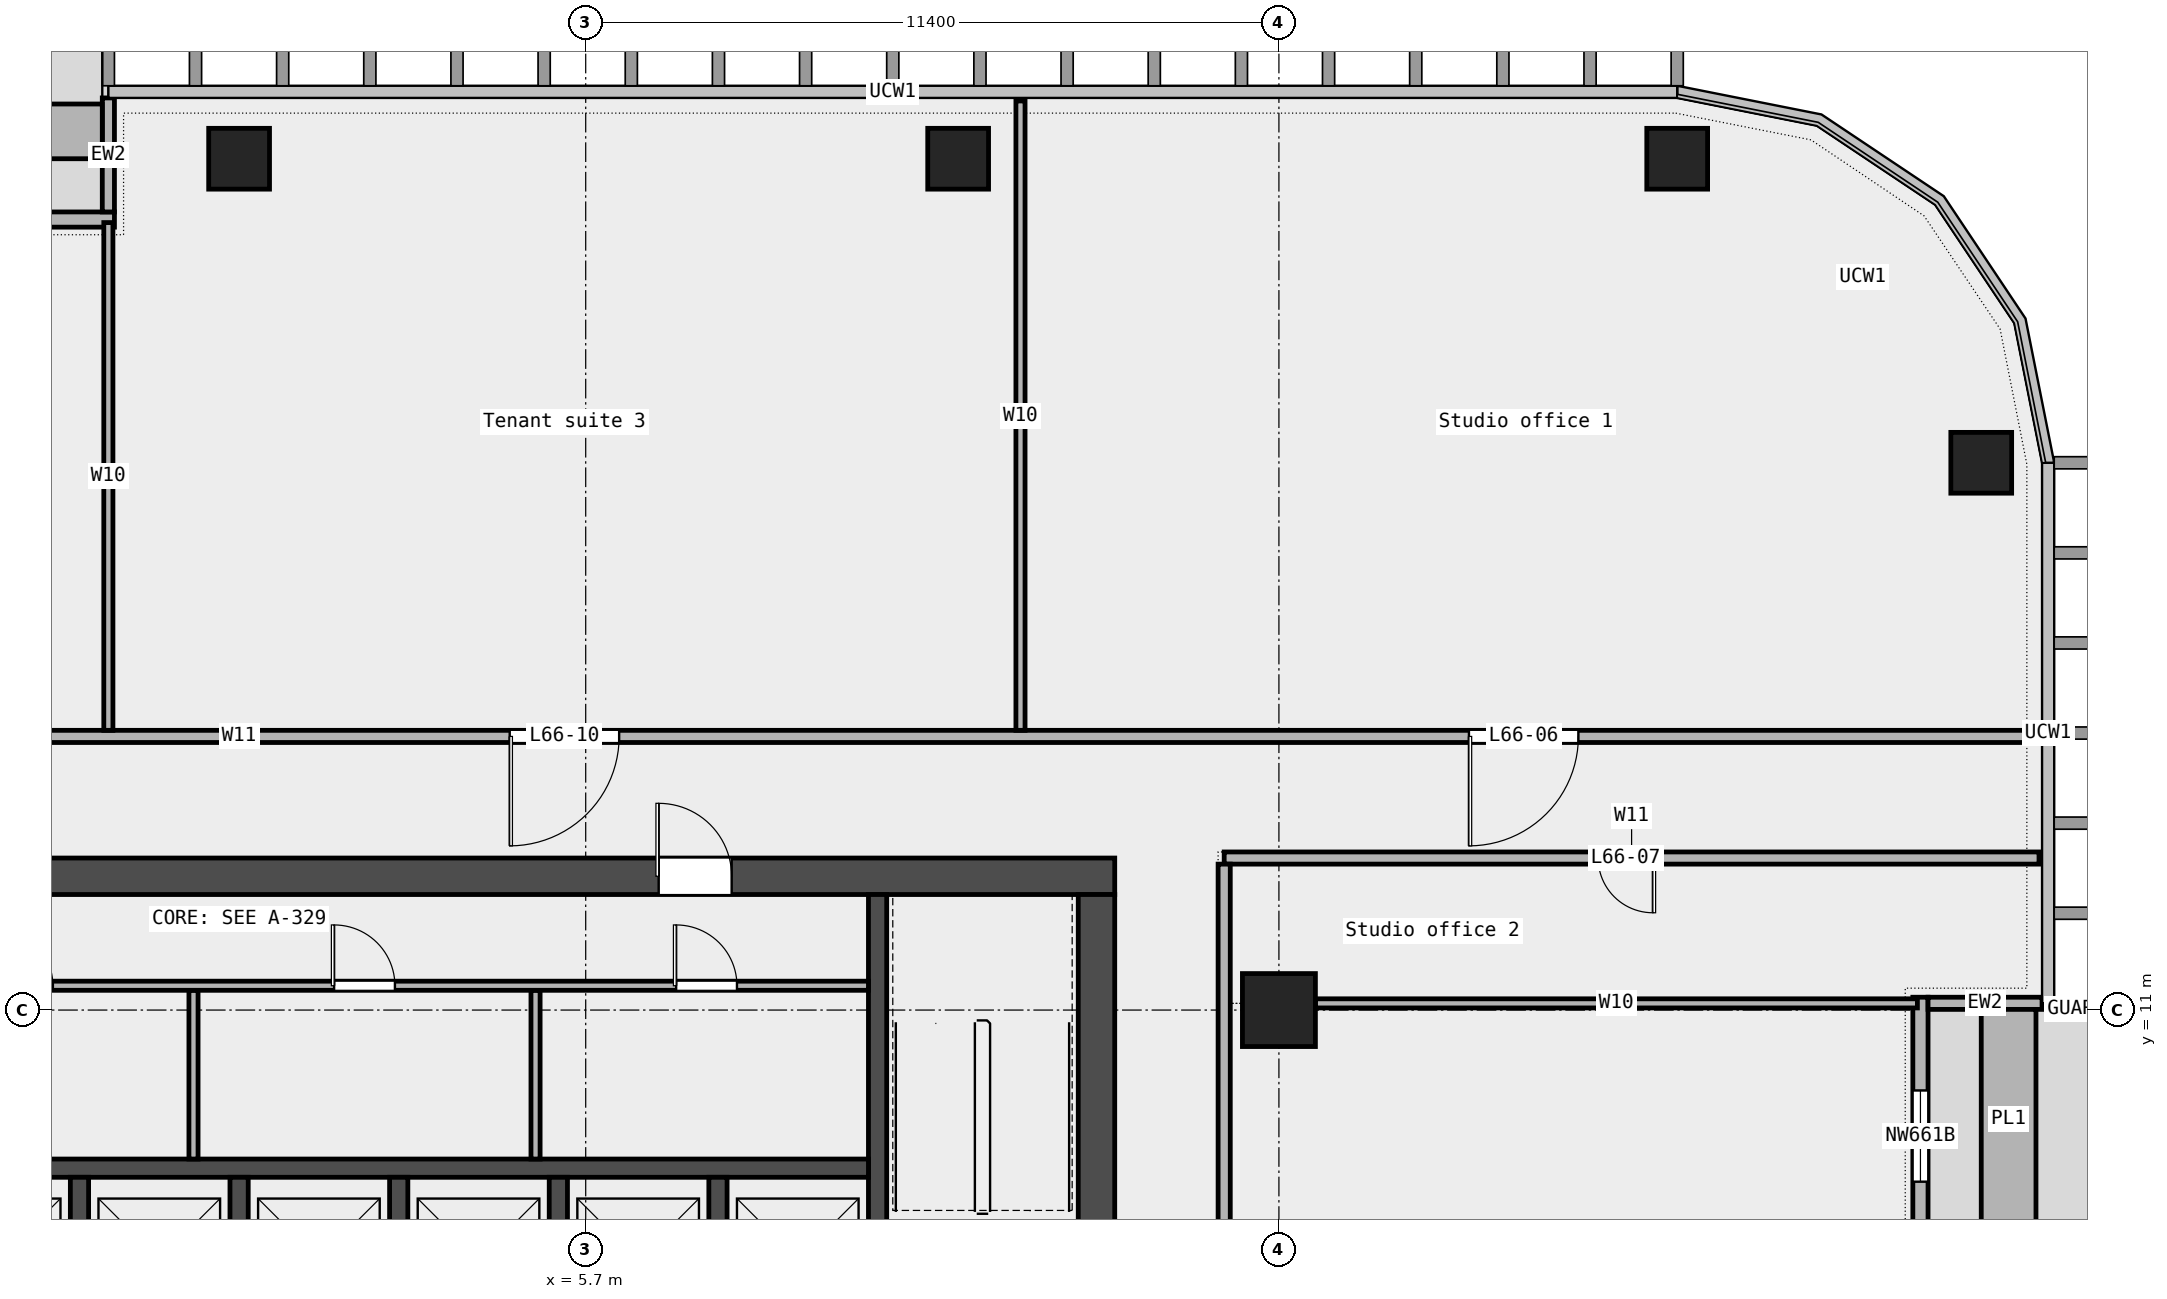
"""IFC4 building model, lengths in metres.
Left out: names, types, materials, properties, quantities, classifications, styles, units other than length and angle.
Written with IfcOpenShell. Run it as: python <this file> out.ifc"""

import sys

from ifc_helpers import new_model, si_unit, direction, frame, frame_2d, origin, origin_2d, place, context, subcontext, project, spatial, rectangle, extrude, element, fill, save


model = new_model("IFC4")
c1 = context("Model", 3, precision=1e-05, world=origin(), true_north=direction((0.0, 1.0)))
c2 = subcontext(c1, "Body", "Model", "MODEL_VIEW")
j1 = project(units=[si_unit("LENGTHUNIT", "METRE"), si_unit("PLANEANGLEUNIT", "RADIAN")], contexts=[c1])
p1 = place(None, origin())
s1 = spatial("IfcSite", under=j1, at=p1, CompositionType="ELEMENT")
p2 = place(p1, origin())
s2 = spatial("IfcBuilding", under=s1, at=p2, CompositionType="ELEMENT")
p3 = place(p2, frame((0.0, 0.0, 303.4)))
s3 = spatial("IfcBuildingStorey", under=s2, at=p3, CompositionType="ELEMENT", Elevation=303.4)
for number, where, z_axis, x_axis in (
    (1, (28.65, 20.0, 0.0), (0.0, 0.0, 1.0), (1.0, 0.0, 0.0)),
    (2, (23.65, 25.0, 0.0), (0.0, 0.0, 1.0), (1.0, 0.0, 0.0)),
    (3, (11.825, 25.0, 0.0), (0.0, 0.0, 1.0), (1.0, 0.0, 0.0)),
    (4, (0.0, 25.0, 0.0), (0.0, 0.0, 1.0), (1.0, 0.0, 0.0)),
):
    element("IfcColumn", number, at=place(p3, frame(where, z_axis=z_axis, x_axis=x_axis)), inside=s3, PredefinedType="COLUMN", context=c2, shape_type="SweptSolid", body=[
        extrude(rectangle(XDim=1.0, YDim=1.0, at=origin_2d()), origin(), (0.0, 0.0, 1.0), 3.6),
    ])
p4 = place(p3, frame((17.1, 11.0, 0.0), z_axis=(0.0, 0.0, 1.0), x_axis=(1.0, 0.0, 0.0)))
e5 = element("IfcColumn", 5, at=p4, inside=s3, PredefinedType="COLUMN", context=c2, shape_type="SweptSolid", body=[
    extrude(rectangle(XDim=1.2, YDim=1.2, at=origin_2d()), origin(), (0.0, 0.0, 1.0), 3.6),
])
p5 = place(p3, frame((27.65, -2.322, 0.0), z_axis=(0.0, 0.0, 1.0), x_axis=(0.0, 1.0, 0.0)))
e6 = element("IfcWall", 6, at=p5, inside=s3, PredefinedType="STANDARD", context=c2, shape_type="SweptSolid", body=[
    extrude(rectangle(XDim=13.533, YDim=0.25, at=frame_2d((6.767, 0.0))), origin(), (0.0, 0.0, 1.0), 3.6),
])
p6 = place(p5, frame((1.5, 0.0, 0.45)))
e7 = element("IfcOpeningElement", 7, at=p6, cuts=e6, PredefinedType="OPENING", context=c2, shape_type="SweptSolid", body=[
    extrude(rectangle(XDim=1.5, YDim=2.4, at=frame_2d((0.75, 1.2))), frame((0.0, 0.137, 0.0), z_axis=(0.0, -1.0, 0.0), x_axis=(1.0, 0.0, 0.0)), (0.0, 0.0, 1.0), 0.274),
])
p7 = place(p5, frame((5.75, 0.0, 0.0)))
e8 = element("IfcOpeningElement", 8, at=p7, cuts=e6, PredefinedType="OPENING", context=c2, shape_type="SweptSolid", body=[
    extrude(rectangle(XDim=1.8, YDim=2.4, at=frame_2d((0.9, 1.2))), frame((0.0, 0.137, 0.0), z_axis=(0.0, -1.0, 0.0), x_axis=(1.0, 0.0, 0.0)), (0.0, 0.0, 1.0), 0.274),
])
p8 = place(p5, frame((10.5, 0.0, 0.45)))
e9 = element("IfcOpeningElement", 9, at=p8, cuts=e6, PredefinedType="OPENING", context=c2, shape_type="SweptSolid", body=[
    extrude(rectangle(XDim=1.5, YDim=2.4, at=frame_2d((0.75, 1.2))), frame((0.0, 0.137, 0.0), z_axis=(0.0, -1.0, 0.0), x_axis=(1.0, 0.0, 0.0)), (0.0, 0.0, 1.0), 0.274),
])
p9 = place(p3, frame((29.65, 11.111, 0.0), z_axis=(0.0, 0.0, 1.0), x_axis=(-1.0, 0.0, 0.0)))
e10 = element("IfcWall", 10, at=p9, inside=s3, PredefinedType="STANDARD", context=c2, shape_type="SweptSolid", body=[
    extrude(rectangle(XDim=1.875, YDim=0.2, at=frame_2d((0.938, 0.0))), origin(), (0.0, 0.0, 1.0), 3.6),
])
p10 = place(p3, frame((29.1, 7.411, 0.0), z_axis=(0.0, 0.0, 1.0), x_axis=(0.0, 1.0, 0.0)))
e11 = element("IfcWall", 11, at=p10, inside=s3, PredefinedType="STANDARD", context=c2, shape_type="SweptSolid", body=[
    extrude(rectangle(XDim=3.6, YDim=0.9, at=frame_2d((1.8, 0.0))), origin(), (0.0, 0.0, 1.0), 0.7),
])
p11 = place(p3, frame((-2.05, 24.0, 0.0), z_axis=(0.0, 0.0, 1.0), x_axis=(-1.0, 0.0, 0.0)))
e12 = element("IfcWall", 12, at=p11, inside=s3, PredefinedType="STANDARD", context=c2, shape_type="SweptSolid", body=[
    extrude(rectangle(XDim=13.1, YDim=0.25, at=frame_2d((6.55, 0.0))), origin(), (0.0, 0.0, 1.0), 3.6),
])
p12 = place(p11, frame((1.5, 0.0, 0.45)))
e13 = element("IfcOpeningElement", 13, at=p12, cuts=e12, PredefinedType="OPENING", context=c2, shape_type="SweptSolid", body=[
    extrude(rectangle(XDim=1.5, YDim=2.4, at=frame_2d((0.75, 1.2))), frame((0.0, 0.137, 0.0), z_axis=(0.0, -1.0, 0.0), x_axis=(1.0, 0.0, 0.0)), (0.0, 0.0, 1.0), 0.274),
])
p13 = place(p11, frame((5.75, 0.0, 0.0)))
e14 = element("IfcOpeningElement", 14, at=p13, cuts=e12, PredefinedType="OPENING", context=c2, shape_type="SweptSolid", body=[
    extrude(rectangle(XDim=1.8, YDim=2.4, at=frame_2d((0.9, 1.2))), frame((0.0, 0.137, 0.0), z_axis=(0.0, -1.0, 0.0), x_axis=(1.0, 0.0, 0.0)), (0.0, 0.0, 1.0), 0.274),
])
p14 = place(p11, frame((10.75, 0.0, 0.45)))
e15 = element("IfcOpeningElement", 15, at=p14, cuts=e12, PredefinedType="OPENING", context=c2, shape_type="SweptSolid", body=[
    extrude(rectangle(XDim=1.5, YDim=2.4, at=frame_2d((0.75, 1.2))), frame((0.0, 0.137, 0.0), z_axis=(0.0, -1.0, 0.0), x_axis=(1.0, 0.0, 0.0)), (0.0, 0.0, 1.0), 0.274),
])
p15 = place(p3, frame((-2.15, 26.0, 0.0), z_axis=(0.0, 0.0, 1.0), x_axis=(0.0, -1.0, 0.0)))
e16 = element("IfcWall", 16, at=p15, inside=s3, PredefinedType="STANDARD", context=c2, shape_type="SweptSolid", body=[
    extrude(rectangle(XDim=1.875, YDim=0.2, at=frame_2d((0.938, 0.0))), origin(), (0.0, 0.0, 1.0), 3.6),
])
p16 = place(p3, frame((-2.25, 25.45, 0.0), z_axis=(0.0, 0.0, 1.0), x_axis=(-1.0, 0.0, 0.0)))
e17 = element("IfcWall", 17, at=p16, inside=s3, PredefinedType="STANDARD", context=c2, shape_type="SweptSolid", body=[
    extrude(rectangle(XDim=3.6, YDim=0.9, at=frame_2d((1.8, 0.0))), origin(), (0.0, 0.0, 1.0), 0.7),
])
p17 = place(p3, frame((17.7, 11.11, 0.0), z_axis=(0.0, 0.0, 1.0), x_axis=(1.0, 0.0, 0.0)))
e18 = element("IfcWall", 18, at=p17, inside=s3, PredefinedType="PARTITIONING", context=c2, shape_type="SweptSolid", body=[
    extrude(rectangle(XDim=9.9, YDim=0.15, at=frame_2d((4.95, 0.0))), origin(), (0.0, 0.0, 1.0), 3.6),
])
p18 = place(p3, frame((16.2, 13.5, 0.0), z_axis=(0.0, 0.0, 1.0), x_axis=(1.0, 0.0, 0.0)))
e19 = element("IfcWall", 19, at=p18, inside=s3, PredefinedType="PARTITIONING", context=c2, shape_type="SweptSolid", body=[
    extrude(rectangle(XDim=13.4, YDim=0.2, at=frame_2d((6.7, 0.0))), origin(), (0.0, 0.0, 1.0), 3.6),
])
p19 = place(p18, frame((6.15, 0.0, 0.0)))
e20 = element("IfcOpeningElement", 20, at=p19, cuts=e19, PredefinedType="OPENING", context=c2, shape_type="SweptSolid", body=[
    extrude(rectangle(XDim=0.9, YDim=2.1, at=frame_2d((0.45, 1.05))), frame((0.0, 0.112, 0.0), z_axis=(0.0, -1.0, 0.0), x_axis=(1.0, 0.0, 0.0)), (0.0, 0.0, 1.0), 0.224),
])
p20 = place(p3, frame((-29.6, 15.5, 0.0), z_axis=(0.0, 0.0, 1.0), x_axis=(1.0, 0.0, 0.0)))
e21 = element("IfcWall", 21, at=p20, inside=s3, PredefinedType="PARTITIONING", context=c2, shape_type="SweptSolid", body=[
    extrude(rectangle(XDim=59.2, YDim=0.2, at=frame_2d((29.6, 0.0))), origin(), (0.0, 0.0, 1.0), 3.6),
])
p21 = place(p20, frame((20.25, 0.0, 0.0)))
e22 = element("IfcOpeningElement", 22, at=p21, cuts=e21, PredefinedType="OPENING", context=c2, shape_type="SweptSolid", body=[
    extrude(rectangle(XDim=1.5, YDim=2.1, at=frame_2d((0.75, 1.05))), frame((0.0, 0.112, 0.0), z_axis=(0.0, -1.0, 0.0), x_axis=(1.0, 0.0, 0.0)), (0.0, 0.0, 1.0), 0.224),
])
p22 = place(p20, frame((49.825, 0.0, 0.0)))
e23 = element("IfcOpeningElement", 23, at=p22, cuts=e21, PredefinedType="OPENING", context=c2, shape_type="SweptSolid", body=[
    extrude(rectangle(XDim=1.8, YDim=2.1, at=frame_2d((0.9, 1.05))), frame((0.0, 0.112, 0.0), z_axis=(0.0, -1.0, 0.0), x_axis=(1.0, 0.0, 0.0)), (0.0, 0.0, 1.0), 0.224),
])
p23 = place(p20, frame((34.05, 0.0, 0.0)))
e24 = element("IfcOpeningElement", 24, at=p23, cuts=e21, PredefinedType="OPENING", context=c2, shape_type="SweptSolid", body=[
    extrude(rectangle(XDim=1.8, YDim=2.1, at=frame_2d((0.9, 1.05))), frame((0.0, 0.112, 0.0), z_axis=(0.0, -1.0, 0.0), x_axis=(1.0, 0.0, 0.0)), (0.0, 0.0, 1.0), 0.224),
])
p24 = place(p20, frame((6.625, 0.0, 0.0)))
e25 = element("IfcOpeningElement", 25, at=p24, cuts=e21, PredefinedType="OPENING", context=c2, shape_type="SweptSolid", body=[
    extrude(rectangle(XDim=1.5, YDim=2.1, at=frame_2d((0.75, 1.05))), frame((0.0, 0.112, 0.0), z_axis=(0.0, -1.0, 0.0), x_axis=(1.0, 0.0, 0.0)), (0.0, 0.0, 1.0), 0.224),
])
p25 = place(p3, frame((-2.15, 15.6, 0.0), z_axis=(0.0, 0.0, 1.0), x_axis=(0.0, 1.0, 0.0)))
e26 = element("IfcWall", 26, at=p25, inside=s3, PredefinedType="PARTITIONING", context=c2, shape_type="SweptSolid", body=[
    extrude(rectangle(XDim=8.35, YDim=0.15, at=frame_2d((4.175, 0.0))), origin(), (0.0, 0.0, 1.0), 3.6),
])
p26 = place(p3, frame((12.85, 15.6, 0.0), z_axis=(0.0, 0.0, 1.0), x_axis=(0.0, 1.0, 0.0)))
e27 = element("IfcWall", 27, at=p26, inside=s3, PredefinedType="PARTITIONING", context=c2, shape_type="SweptSolid", body=[
    extrude(rectangle(XDim=10.35, YDim=0.15, at=frame_2d((5.175, 0.0))), origin(), (0.0, 0.0, 1.0), 3.6),
])
p27 = place(p3, frame((16.2, -7.1, 0.0), z_axis=(0.0, 0.0, 1.0), x_axis=(0.0, 1.0, 0.0)))
e28 = element("IfcWall", 28, at=p27, inside=s3, PredefinedType="PARTITIONING", context=c2, shape_type="SweptSolid", body=[
    extrude(rectangle(XDim=20.5, YDim=0.2, at=frame_2d((10.25, 0.0))), origin(), (0.0, 0.0, 1.0), 3.6),
])
p28 = place(p27, frame((10.795, 0.0, 0.0)))
e29 = element("IfcOpeningElement", 29, at=p28, cuts=e28, PredefinedType="OPENING", context=c2, shape_type="SweptSolid", body=[
    extrude(rectangle(XDim=1.5, YDim=2.1, at=frame_2d((0.75, 1.05))), frame((0.0, 0.112, 0.0), z_axis=(0.0, -1.0, 0.0), x_axis=(1.0, 0.0, 0.0)), (0.0, 0.0, 1.0), 0.224),
])
p29 = place(p3, frame((-14.4, 13.2, 0.0), z_axis=(0.0, 0.0, 1.0), x_axis=(1.0, 0.0, 0.0)))
e30 = element("IfcWall", 30, at=p29, inside=s3, PredefinedType="SHEAR", context=c2, shape_type="SweptSolid", body=[
    extrude(rectangle(XDim=28.8, YDim=0.6, at=frame_2d((14.4, 0.0))), origin(), (0.0, 0.0, 1.0), 3.7),
])
p30 = place(p29, frame((6.3, 0.0, 0.0)))
e31 = element("IfcOpeningElement", 31, at=p30, cuts=e30, PredefinedType="OPENING", context=c2, shape_type="SweptSolid", body=[
    extrude(rectangle(XDim=1.2, YDim=2.1, at=frame_2d((0.6, 1.05))), frame((0.0, 0.312, 0.0), z_axis=(0.0, -1.0, 0.0), x_axis=(1.0, 0.0, 0.0)), (0.0, 0.0, 1.0), 0.624),
])
p31 = place(p29, frame((21.3, 0.0, 0.0)))
e32 = element("IfcOpeningElement", 32, at=p31, cuts=e30, PredefinedType="OPENING", context=c2, shape_type="SweptSolid", body=[
    extrude(rectangle(XDim=1.2, YDim=2.1, at=frame_2d((0.6, 1.05))), frame((0.0, 0.312, 0.0), z_axis=(0.0, -1.0, 0.0), x_axis=(1.0, 0.0, 0.0)), (0.0, 0.0, 1.0), 0.624),
])
p32 = place(p3, frame((14.1, -6.6, 0.0), z_axis=(0.0, 0.0, 1.0), x_axis=(0.0, 1.0, 0.0)))
e33 = element("IfcWall", 33, at=p32, inside=s3, PredefinedType="SHEAR", context=c2, shape_type="SweptSolid", body=[
    extrude(rectangle(XDim=19.5, YDim=0.6, at=frame_2d((9.75, 0.0))), origin(), (0.0, 0.0, 1.0), 3.7),
])
p33 = place(p32, frame((9.3, 0.0, 0.0)))
e34 = element("IfcOpeningElement", 34, at=p33, cuts=e33, PredefinedType="OPENING", context=c2, shape_type="SweptSolid", body=[
    extrude(rectangle(XDim=1.8, YDim=2.1, at=frame_2d((0.9, 1.05))), frame((0.0, 0.312, 0.0), z_axis=(0.0, -1.0, 0.0), x_axis=(1.0, 0.0, 0.0)), (0.0, 0.0, 1.0), 0.624),
])
p34 = place(p3, frame((10.5, 5.25, 0.0), z_axis=(0.0, 0.0, 1.0), x_axis=(0.0, 1.0, 0.0)))
e35 = element("IfcWall", 35, at=p34, inside=s3, PredefinedType="SHEAR", context=c2, shape_type="SweptSolid", body=[
    extrude(rectangle(XDim=7.65, YDim=0.3, at=frame_2d((3.825, 0.0))), origin(), (0.0, 0.0, 1.0), 3.7),
])
p35 = place(p3, frame((-10.35, 8.4, 0.0), z_axis=(0.0, 0.0, 1.0), x_axis=(1.0, 0.0, 0.0)))
e36 = element("IfcWall", 36, at=p35, inside=s3, PredefinedType="SOLIDWALL", context=c2, shape_type="SweptSolid", body=[
    extrude(rectangle(XDim=20.7, YDim=0.3, at=frame_2d((10.35, 0.0))), origin(), (0.0, 0.0, 1.0), 3.7),
])
for number, where, z_axis, x_axis in (
    (37, (-2.625, 5.55, 0.0), (0.0, 0.0, 1.0), (0.0, 1.0, 0.0)),
    (38, (0.0, 5.55, 0.0), (0.0, 0.0, 1.0), (0.0, 1.0, 0.0)),
    (39, (2.625, 5.55, 0.0), (0.0, 0.0, 1.0), (0.0, 1.0, 0.0)),
    (40, (5.25, 5.55, 0.0), (0.0, 0.0, 1.0), (0.0, 1.0, 0.0)),
    (41, (7.875, 5.55, 0.0), (0.0, 0.0, 1.0), (0.0, 1.0, 0.0)),
):
    element("IfcWall", number, at=place(p3, frame(where, z_axis=z_axis, x_axis=x_axis)), inside=s3, PredefinedType="SOLIDWALL", context=c2, shape_type="SweptSolid", body=[
        extrude(rectangle(XDim=2.7, YDim=0.3, at=frame_2d((1.35, 0.0))), origin(), (0.0, 0.0, 1.0), 3.7),
    ])
for number, where, z_axis, x_axis in (
    (42, (-0.75, 8.55, 0.0), (0.0, 0.0, 1.0), (0.0, 1.0, 0.0)),
    (43, (4.875, 8.55, 0.0), (0.0, 0.0, 1.0), (0.0, 1.0, 0.0)),
):
    element("IfcWall", number, at=place(p3, frame(where, z_axis=z_axis, x_axis=x_axis)), inside=s3, PredefinedType="PARTITIONING", context=c2, shape_type="SweptSolid", body=[
        extrude(rectangle(XDim=2.775, YDim=0.15, at=frame_2d((1.387, 0.0))), origin(), (0.0, 0.0, 1.0), 3.7),
    ])
p36 = place(p3, frame((-10.35, 11.4, 0.0), z_axis=(0.0, 0.0, 1.0), x_axis=(1.0, 0.0, 0.0)))
e44 = element("IfcWall", 44, at=p36, inside=s3, PredefinedType="PARTITIONING", context=c2, shape_type="SweptSolid", body=[
    extrude(rectangle(XDim=20.7, YDim=0.15, at=frame_2d((10.35, 0.0))), origin(), (0.0, 0.0, 1.0), 3.7),
])
p37 = place(p36, frame((1.413, 0.0, 0.0)))
e45 = element("IfcOpeningElement", 45, at=p37, cuts=e44, PredefinedType="OPENING", context=c2, shape_type="SweptSolid", body=[
    extrude(rectangle(XDim=1.0, YDim=2.1, at=frame_2d((0.5, 1.05))), frame((0.0, 0.087, 0.0), z_axis=(0.0, -1.0, 0.0), x_axis=(1.0, 0.0, 0.0)), (0.0, 0.0, 1.0), 0.174),
])
p38 = place(p36, frame((6.288, 0.0, 0.0)))
e46 = element("IfcOpeningElement", 46, at=p38, cuts=e44, PredefinedType="OPENING", context=c2, shape_type="SweptSolid", body=[
    extrude(rectangle(XDim=1.0, YDim=2.1, at=frame_2d((0.5, 1.05))), frame((0.0, 0.087, 0.0), z_axis=(0.0, -1.0, 0.0), x_axis=(1.0, 0.0, 0.0)), (0.0, 0.0, 1.0), 0.174),
])
p39 = place(p36, frame((11.913, 0.0, 0.0)))
e47 = element("IfcOpeningElement", 47, at=p39, cuts=e44, PredefinedType="OPENING", context=c2, shape_type="SweptSolid", body=[
    extrude(rectangle(XDim=1.0, YDim=2.1, at=frame_2d((0.5, 1.05))), frame((0.0, 0.087, 0.0), z_axis=(0.0, -1.0, 0.0), x_axis=(1.0, 0.0, 0.0)), (0.0, 0.0, 1.0), 0.174),
])
p40 = place(p36, frame((17.538, 0.0, 0.0)))
e48 = element("IfcOpeningElement", 48, at=p40, cuts=e44, PredefinedType="OPENING", context=c2, shape_type="SweptSolid", body=[
    extrude(rectangle(XDim=1.0, YDim=2.1, at=frame_2d((0.5, 1.05))), frame((0.0, 0.087, 0.0), z_axis=(0.0, -1.0, 0.0), x_axis=(1.0, 0.0, 0.0)), (0.0, 0.0, 1.0), 0.174),
])
p41 = place(p8, origin())
e49 = element("IfcWindow", 49, at=p41, inside=s3, PartitioningType="SINGLE_PANEL", PredefinedType="WINDOW", context=c2, shape_type="SweptSolid", body=[
    extrude(rectangle(XDim=1.5, YDim=2.4, at=frame_2d((0.75, 1.2))), frame((0.0, 0.03, 0.0), z_axis=(0.0, -1.0, 0.0), x_axis=(1.0, 0.0, 0.0)), (0.0, 0.0, 1.0), 0.06),
])
fill(e9, e49)
p42 = place(p22, origin())
e50 = element("IfcDoor", 50, at=p42, inside=s3, OperationType="DOUBLE_DOOR_SINGLE_SWING", PredefinedType="DOOR", context=c2, shape_type="SweptSolid", body=[
    extrude(rectangle(XDim=1.8, YDim=2.1, at=frame_2d((0.9, 1.05))), frame((0.0, 0.025, 0.0), z_axis=(0.0, -1.0, 0.0), x_axis=(1.0, 0.0, 0.0)), (0.0, 0.0, 1.0), 0.05),
])
fill(e23, e50)
p43 = place(p19, origin())
e51 = element("IfcDoor", 51, at=p43, inside=s3, OperationType="SINGLE_SWING_LEFT", PredefinedType="DOOR", context=c2, shape_type="SweptSolid", body=[
    extrude(rectangle(XDim=0.9, YDim=2.1, at=frame_2d((0.45, 1.05))), frame((0.0, 0.025, 0.0), z_axis=(0.0, -1.0, 0.0), x_axis=(1.0, 0.0, 0.0)), (0.0, 0.0, 1.0), 0.05),
])
fill(e20, e51)
p44 = place(p23, origin())
e52 = element("IfcDoor", 52, at=p44, inside=s3, OperationType="DOUBLE_DOOR_SINGLE_SWING", PredefinedType="DOOR", context=c2, shape_type="SweptSolid", body=[
    extrude(rectangle(XDim=1.8, YDim=2.1, at=frame_2d((0.9, 1.05))), frame((0.0, 0.025, 0.0), z_axis=(0.0, -1.0, 0.0), x_axis=(1.0, 0.0, 0.0)), (0.0, 0.0, 1.0), 0.05),
])
fill(e24, e52)
p45 = place(p38, origin())
e53 = element("IfcDoor", 53, at=p45, inside=s3, OperationType="SINGLE_SWING_LEFT", PredefinedType="DOOR", context=c2, shape_type="SweptSolid", body=[
    extrude(rectangle(XDim=1.0, YDim=2.1, at=frame_2d((0.5, 1.05))), frame((0.0, 0.025, 0.0), z_axis=(0.0, -1.0, 0.0), x_axis=(1.0, 0.0, 0.0)), (0.0, 0.0, 1.0), 0.05),
])
fill(e46, e53)
p46 = place(p39, origin())
e54 = element("IfcDoor", 54, at=p46, inside=s3, OperationType="SINGLE_SWING_LEFT", PredefinedType="DOOR", context=c2, shape_type="SweptSolid", body=[
    extrude(rectangle(XDim=1.0, YDim=2.1, at=frame_2d((0.5, 1.05))), frame((0.0, 0.025, 0.0), z_axis=(0.0, -1.0, 0.0), x_axis=(1.0, 0.0, 0.0)), (0.0, 0.0, 1.0), 0.05),
])
fill(e47, e54)
p47 = place(p40, origin())
e55 = element("IfcDoor", 55, at=p47, inside=s3, OperationType="SINGLE_SWING_LEFT", PredefinedType="DOOR", context=c2, shape_type="SweptSolid", body=[
    extrude(rectangle(XDim=1.0, YDim=2.1, at=frame_2d((0.5, 1.05))), frame((0.0, 0.025, 0.0), z_axis=(0.0, -1.0, 0.0), x_axis=(1.0, 0.0, 0.0)), (0.0, 0.0, 1.0), 0.05),
])
fill(e48, e55)
p48 = place(p31, origin())
e56 = element("IfcDoor", 56, at=p48, inside=s3, OperationType="SINGLE_SWING_RIGHT", PredefinedType="DOOR", context=c2, shape_type="SweptSolid", body=[
    extrude(rectangle(XDim=1.2, YDim=2.1, at=frame_2d((0.6, 1.05))), frame((0.0, 0.025, 0.0), z_axis=(0.0, -1.0, 0.0), x_axis=(1.0, 0.0, 0.0)), (0.0, 0.0, 1.0), 0.05),
])
fill(e32, e56)
save(model, sys.argv[1])
